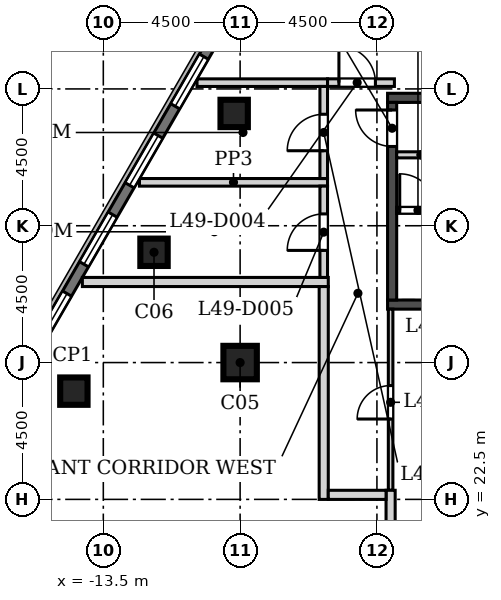
"""IFC4 building model, lengths in metres.
Left out: names, types, materials, properties, quantities, classifications, styles, units other than length and angle.
Written with IfcOpenShell. Run it as: python <this file> out.ifc"""

import sys

from ifc_helpers import new_model, si_unit, direction, frame, frame_2d, origin, origin_2d, place, context, subcontext, project, spatial, rectangle, extrude, element, fill, save


model = new_model("IFC4")
c1 = context("Model", 3, precision=1e-05, world=origin(), true_north=direction((0.0, 1.0)))
c2 = subcontext(c1, "Body", "Model", "MODEL_VIEW")
j1 = project(units=[si_unit("LENGTHUNIT", "METRE"), si_unit("PLANEANGLEUNIT", "RADIAN")], contexts=[c1])
p1 = place(None, origin())
s1 = spatial("IfcSite", under=j1, at=p1, CompositionType="ELEMENT")
p2 = place(p1, origin())
s2 = spatial("IfcBuilding", under=s1, at=p2, CompositionType="ELEMENT")
p3 = place(p2, frame((0.0, 0.0, 218.1)))
s3 = spatial("IfcBuildingStorey", under=s2, at=p3, CompositionType="ELEMENT", Elevation=218.1)
for number, where, z_axis, x_axis in (
    (1, (-9.196, 35.194, 0.0), (0.0, 0.0, 1.0), (1.0, 0.0, 0.0)),
    (2, (-11.832, 30.627, 0.0), (0.0, 0.0, 1.0), (1.0, 0.0, 0.0)),
    (3, (-14.469, 26.06, 0.0), (0.0, 0.0, 1.0), (1.0, 0.0, 0.0)),
):
    element("IfcColumn", number, at=place(p3, frame(where, z_axis=z_axis, x_axis=x_axis)), inside=s3, PredefinedType="COLUMN", context=c2, shape_type="SweptSolid", body=[
        extrude(rectangle(XDim=0.9, YDim=0.9, at=origin_2d()), origin(), (0.0, 0.0, 1.0), 5.4),
    ])
p4 = place(p3, frame((-9.0, 27.0, 0.0), z_axis=(0.0, 0.0, 1.0), x_axis=(1.0, 0.0, 0.0)))
e4 = element("IfcColumn", 4, at=p4, inside=s3, PredefinedType="COLUMN", context=c2, shape_type="SweptSolid", body=[
    extrude(rectangle(XDim=1.1, YDim=1.1, at=origin_2d()), origin(), (0.0, 0.0, 1.0), 5.4),
])
p5 = place(p3, frame((-4.353, 47.177, 0.0), z_axis=(0.0, 0.0, 1.0), x_axis=(-0.500000533701, -0.866025095652, 0.0)))
e5 = element("IfcWall", 5, at=p5, inside=s3, PredefinedType="SOLIDWALL", context=c2, shape_type="SweptSolid", body=[
    extrude(rectangle(XDim=45.573, YDim=0.34, at=frame_2d((22.787, 0.0))), origin(), (0.0, 0.0, 1.0), 5.0),
])
p6 = place(p5, frame((2.68, 0.0, 0.9)))
e6 = element("IfcOpeningElement", 6, at=p6, cuts=e5, PredefinedType="OPENING", context=c2, shape_type="SweptSolid", body=[
    extrude(rectangle(XDim=1.885, YDim=3.0, at=frame_2d((0.942, 1.5))), frame((0.0, 0.18, 0.0), z_axis=(0.0, -1.0, 0.0), x_axis=(1.0, 0.0, 0.0)), (0.0, 0.0, 1.0), 0.36),
])
p7 = place(p5, frame((5.68, 0.0, 0.9)))
e7 = element("IfcOpeningElement", 7, at=p7, cuts=e5, PredefinedType="OPENING", context=c2, shape_type="SweptSolid", body=[
    extrude(rectangle(XDim=1.885, YDim=3.0, at=frame_2d((0.942, 1.5))), frame((0.0, 0.18, 0.0), z_axis=(0.0, -1.0, 0.0), x_axis=(1.0, 0.0, 0.0)), (0.0, 0.0, 1.0), 0.36),
])
p8 = place(p5, frame((8.68, 0.0, 0.9)))
e8 = element("IfcOpeningElement", 8, at=p8, cuts=e5, PredefinedType="OPENING", context=c2, shape_type="SweptSolid", body=[
    extrude(rectangle(XDim=1.885, YDim=3.0, at=frame_2d((0.942, 1.5))), frame((0.0, 0.18, 0.0), z_axis=(0.0, -1.0, 0.0), x_axis=(1.0, 0.0, 0.0)), (0.0, 0.0, 1.0), 0.36),
])
p9 = place(p5, frame((11.68, 0.0, 0.9)))
e9 = element("IfcOpeningElement", 9, at=p9, cuts=e5, PredefinedType="OPENING", context=c2, shape_type="SweptSolid", body=[
    extrude(rectangle(XDim=1.885, YDim=3.0, at=frame_2d((0.942, 1.5))), frame((0.0, 0.18, 0.0), z_axis=(0.0, -1.0, 0.0), x_axis=(1.0, 0.0, 0.0)), (0.0, 0.0, 1.0), 0.36),
])
p10 = place(p5, frame((14.68, 0.0, 0.9)))
e10 = element("IfcOpeningElement", 10, at=p10, cuts=e5, PredefinedType="OPENING", context=c2, shape_type="SweptSolid", body=[
    extrude(rectangle(XDim=1.885, YDim=3.0, at=frame_2d((0.942, 1.5))), frame((0.0, 0.18, 0.0), z_axis=(0.0, -1.0, 0.0), x_axis=(1.0, 0.0, 0.0)), (0.0, 0.0, 1.0), 0.36),
])
p11 = place(p5, frame((17.68, 0.0, 0.9)))
e11 = element("IfcOpeningElement", 11, at=p11, cuts=e5, PredefinedType="OPENING", context=c2, shape_type="SweptSolid", body=[
    extrude(rectangle(XDim=1.885, YDim=3.0, at=frame_2d((0.942, 1.5))), frame((0.0, 0.18, 0.0), z_axis=(0.0, -1.0, 0.0), x_axis=(1.0, 0.0, 0.0)), (0.0, 0.0, 1.0), 0.36),
])
p12 = place(p5, frame((20.68, 0.0, 0.9)))
e12 = element("IfcOpeningElement", 12, at=p12, cuts=e5, PredefinedType="OPENING", context=c2, shape_type="SweptSolid", body=[
    extrude(rectangle(XDim=1.885, YDim=3.0, at=frame_2d((0.942, 1.5))), frame((0.0, 0.18, 0.0), z_axis=(0.0, -1.0, 0.0), x_axis=(1.0, 0.0, 0.0)), (0.0, 0.0, 1.0), 0.36),
])
p13 = place(p5, frame((23.68, 0.0, 0.9)))
e13 = element("IfcOpeningElement", 13, at=p13, cuts=e5, PredefinedType="OPENING", context=c2, shape_type="SweptSolid", body=[
    extrude(rectangle(XDim=1.885, YDim=3.0, at=frame_2d((0.942, 1.5))), frame((0.0, 0.18, 0.0), z_axis=(0.0, -1.0, 0.0), x_axis=(1.0, 0.0, 0.0)), (0.0, 0.0, 1.0), 0.36),
])
p14 = place(p5, frame((26.68, 0.0, 0.9)))
e14 = element("IfcOpeningElement", 14, at=p14, cuts=e5, PredefinedType="OPENING", context=c2, shape_type="SweptSolid", body=[
    extrude(rectangle(XDim=1.885, YDim=3.0, at=frame_2d((0.942, 1.5))), frame((0.0, 0.18, 0.0), z_axis=(0.0, -1.0, 0.0), x_axis=(1.0, 0.0, 0.0)), (0.0, 0.0, 1.0), 0.36),
])
p15 = place(p5, frame((29.68, 0.0, 0.9)))
e15 = element("IfcOpeningElement", 15, at=p15, cuts=e5, PredefinedType="OPENING", context=c2, shape_type="SweptSolid", body=[
    extrude(rectangle(XDim=1.885, YDim=3.0, at=frame_2d((0.942, 1.5))), frame((0.0, 0.18, 0.0), z_axis=(0.0, -1.0, 0.0), x_axis=(1.0, 0.0, 0.0)), (0.0, 0.0, 1.0), 0.36),
])
p16 = place(p5, frame((32.68, 0.0, 0.9)))
e16 = element("IfcOpeningElement", 16, at=p16, cuts=e5, PredefinedType="OPENING", context=c2, shape_type="SweptSolid", body=[
    extrude(rectangle(XDim=1.885, YDim=3.0, at=frame_2d((0.942, 1.5))), frame((0.0, 0.18, 0.0), z_axis=(0.0, -1.0, 0.0), x_axis=(1.0, 0.0, 0.0)), (0.0, 0.0, 1.0), 0.36),
])
p17 = place(p5, frame((35.68, 0.0, 0.9)))
e17 = element("IfcOpeningElement", 17, at=p17, cuts=e5, PredefinedType="OPENING", context=c2, shape_type="SweptSolid", body=[
    extrude(rectangle(XDim=1.885, YDim=3.0, at=frame_2d((0.942, 1.5))), frame((0.0, 0.18, 0.0), z_axis=(0.0, -1.0, 0.0), x_axis=(1.0, 0.0, 0.0)), (0.0, 0.0, 1.0), 0.36),
])
p18 = place(p5, frame((38.68, 0.0, 0.9)))
e18 = element("IfcOpeningElement", 18, at=p18, cuts=e5, PredefinedType="OPENING", context=c2, shape_type="SweptSolid", body=[
    extrude(rectangle(XDim=1.885, YDim=3.0, at=frame_2d((0.942, 1.5))), frame((0.0, 0.18, 0.0), z_axis=(0.0, -1.0, 0.0), x_axis=(1.0, 0.0, 0.0)), (0.0, 0.0, 1.0), 0.36),
])
p19 = place(p5, frame((41.68, 0.0, 0.9)))
e19 = element("IfcOpeningElement", 19, at=p19, cuts=e5, PredefinedType="OPENING", context=c2, shape_type="SweptSolid", body=[
    extrude(rectangle(XDim=1.885, YDim=3.0, at=frame_2d((0.942, 1.5))), frame((0.0, 0.18, 0.0), z_axis=(0.0, -1.0, 0.0), x_axis=(1.0, 0.0, 0.0)), (0.0, 0.0, 1.0), 0.36),
])
p20 = place(p3, frame((-4.15, 28.907, -0.4), z_axis=(0.0, 0.0, 1.0), x_axis=(1.0, 0.0, 0.0)))
e20 = element("IfcWall", 20, at=p20, inside=s3, PredefinedType="SOLIDWALL", context=c2, shape_type="SweptSolid", body=[
    extrude(rectangle(XDim=8.3, YDim=0.3, at=frame_2d((4.15, 0.0))), origin(), (0.0, 0.0, 1.0), 5.4),
])
p21 = place(p20, frame((1.55, 0.0, 0.4)))
e21 = element("IfcOpeningElement", 21, at=p21, cuts=e20, PredefinedType="OPENING", context=c2, shape_type="SweptSolid", body=[
    extrude(rectangle(XDim=1.2, YDim=2.1, at=frame_2d((0.6, 1.05))), frame((0.0, 0.16, 0.0), z_axis=(0.0, -1.0, 0.0), x_axis=(1.0, 0.0, 0.0)), (0.0, 0.0, 1.0), 0.32),
])
p22 = place(p3, frame((-4.15, 35.707, -0.4), z_axis=(0.0, 0.0, 1.0), x_axis=(1.0, 0.0, 0.0)))
e22 = element("IfcWall", 22, at=p22, inside=s3, PredefinedType="SOLIDWALL", context=c2, shape_type="SweptSolid", body=[
    extrude(rectangle(XDim=8.3, YDim=0.3, at=frame_2d((4.15, 0.0))), origin(), (0.0, 0.0, 1.0), 5.4),
])
p23 = place(p3, frame((-4.0, 29.057, -0.4), z_axis=(0.0, 0.0, 1.0), x_axis=(0.0, 1.0, 0.0)))
e23 = element("IfcWall", 23, at=p23, inside=s3, PredefinedType="SOLIDWALL", context=c2, shape_type="SweptSolid", body=[
    extrude(rectangle(XDim=6.5, YDim=0.3, at=frame_2d((3.25, 0.0))), origin(), (0.0, 0.0, 1.0), 5.4),
])
p24 = place(p23, frame((5.05, 0.0, 0.4)))
e24 = element("IfcOpeningElement", 24, at=p24, cuts=e23, PredefinedType="OPENING", context=c2, shape_type="SweptSolid", body=[
    extrude(rectangle(XDim=1.2, YDim=2.1, at=frame_2d((0.6, 1.05))), frame((0.0, 0.16, 0.0), z_axis=(0.0, -1.0, 0.0), x_axis=(1.0, 0.0, 0.0)), (0.0, 0.0, 1.0), 0.32),
])
p25 = place(p3, frame((-3.85, 32.007, -0.4), z_axis=(0.0, 0.0, 1.0), x_axis=(1.0, 0.0, 0.0)))
e25 = element("IfcWall", 25, at=p25, inside=s3, PredefinedType="SOLIDWALL", context=c2, shape_type="SweptSolid", body=[
    extrude(rectangle(XDim=7.7, YDim=0.2, at=frame_2d((3.85, 0.0))), origin(), (0.0, 0.0, 1.0), 5.4),
])
p26 = place(p25, frame((0.1, 0.0, 0.4)))
e26 = element("IfcOpeningElement", 26, at=p26, cuts=e25, PredefinedType="OPENING", context=c2, shape_type="SweptSolid", body=[
    extrude(rectangle(XDim=1.2, YDim=2.1, at=frame_2d((0.6, 1.05))), frame((0.0, 0.11, 0.0), z_axis=(0.0, -1.0, 0.0), x_axis=(1.0, 0.0, 0.0)), (0.0, 0.0, 1.0), 0.22),
])
p27 = place(p3, frame((-3.85, 33.832, 0.0), z_axis=(0.0, 0.0, 1.0), x_axis=(1.0, 0.0, 0.0)))
e27 = element("IfcWall", 27, at=p27, inside=s3, PredefinedType="SOLIDWALL", context=c2, shape_type="SweptSolid", body=[
    extrude(rectangle(XDim=1.6, YDim=0.2, at=frame_2d((0.8, 0.0))), origin(), (0.0, 0.0, 1.0), 5.0),
])
p28 = place(p3, frame((-14.189, 29.65, 0.0), z_axis=(0.0, 0.0, 1.0), x_axis=(1.0, 0.0, 0.0)))
e28 = element("IfcWall", 28, at=p28, inside=s3, PredefinedType="SOLIDWALL", context=c2, shape_type="SweptSolid", body=[
    extrude(rectangle(XDim=8.089, YDim=0.3, at=frame_2d((4.044, 0.0))), origin(), (0.0, 0.0, 1.0), 5.0),
])
p29 = place(p3, frame((-6.25, 22.499, 0.0), z_axis=(0.0, 0.0, 1.0), x_axis=(0.0, 1.0, 0.0)))
e29 = element("IfcWall", 29, at=p29, inside=s3, PredefinedType="SOLIDWALL", context=c2, shape_type="SweptSolid", body=[
    extrude(rectangle(XDim=7.001, YDim=0.3, at=frame_2d((3.5, 0.0))), origin(), (0.0, 0.0, 1.0), 5.0),
])
p30 = place(p3, frame((-12.311, 32.928, 0.0), z_axis=(0.0, 0.0, 1.0), x_axis=(1.0, 0.0, 0.0)))
e30 = element("IfcWall", 30, at=p30, inside=s3, PredefinedType="SOLIDWALL", context=c2, shape_type="SweptSolid", body=[
    extrude(rectangle(XDim=6.186, YDim=0.25, at=frame_2d((3.093, 0.0))), origin(), (0.0, 0.0, 1.0), 5.0),
])
p31 = place(p3, frame((-4.05, 22.799, 0.0), z_axis=(0.0, 0.0, 1.0), x_axis=(0.0, 1.0, 0.0)))
e31 = element("IfcWall", 31, at=p31, inside=s3, PredefinedType="PARTITIONING", context=c2, shape_type="SweptSolid", body=[
    extrude(rectangle(XDim=5.958, YDim=0.15, at=frame_2d((2.979, 0.0))), origin(), (0.0, 0.0, 1.0), 5.0),
])
p32 = place(p31, frame((2.344, 0.0, 0.0)))
e32 = element("IfcOpeningElement", 32, at=p32, cuts=e31, PredefinedType="OPENING", context=c2, shape_type="SweptSolid", body=[
    extrude(rectangle(XDim=1.1, YDim=2.1, at=frame_2d((0.55, 1.05))), frame((0.0, 0.085, 0.0), z_axis=(0.0, -1.0, 0.0), x_axis=(1.0, 0.0, 0.0)), (0.0, 0.0, 1.0), 0.17),
])
p33 = place(p3, frame((-6.125, 36.206, 0.0), z_axis=(0.0, 0.0, 1.0), x_axis=(-1.0, 0.0, 0.0)))
e33 = element("IfcWall", 33, at=p33, inside=s3, PredefinedType="SOLIDWALL", context=c2, shape_type="SweptSolid", body=[
    extrude(rectangle(XDim=4.293, YDim=0.25, at=frame_2d((2.146, 0.0))), origin(), (0.0, 0.0, 1.0), 5.0),
])
p34 = place(p3, frame((-6.25, 33.053, 0.0), z_axis=(0.0, 0.0, 1.0), x_axis=(0.0, 1.0, 0.0)))
e34 = element("IfcWall", 34, at=p34, inside=s3, PredefinedType="SOLIDWALL", context=c2, shape_type="SweptSolid", body=[
    extrude(rectangle(XDim=3.028, YDim=0.25, at=frame_2d((1.514, 0.0))), origin(), (0.0, 0.0, 1.0), 5.0),
])
p35 = place(p34, frame((0.914, 0.0, 0.0)))
e35 = element("IfcOpeningElement", 35, at=p35, cuts=e34, PredefinedType="OPENING", context=c2, shape_type="SweptSolid", body=[
    extrude(rectangle(XDim=1.2, YDim=2.1, at=frame_2d((0.6, 1.05))), frame((0.0, 0.135, 0.0), z_axis=(0.0, -1.0, 0.0), x_axis=(1.0, 0.0, 0.0)), (0.0, 0.0, 1.0), 0.27),
])
p36 = place(p3, frame((-6.25, 29.8, 0.0), z_axis=(0.0, 0.0, 1.0), x_axis=(0.0, 1.0, 0.0)))
e36 = element("IfcWall", 36, at=p36, inside=s3, PredefinedType="SOLIDWALL", context=c2, shape_type="SweptSolid", body=[
    extrude(rectangle(XDim=3.003, YDim=0.25, at=frame_2d((1.501, 0.0))), origin(), (0.0, 0.0, 1.0), 5.0),
])
p37 = place(p36, frame((0.889, 0.0, 0.0)))
e37 = element("IfcOpeningElement", 37, at=p37, cuts=e36, PredefinedType="OPENING", context=c2, shape_type="SweptSolid", body=[
    extrude(rectangle(XDim=1.2, YDim=2.1, at=frame_2d((0.6, 1.05))), frame((0.0, 0.135, 0.0), z_axis=(0.0, -1.0, 0.0), x_axis=(1.0, 0.0, 0.0)), (0.0, 0.0, 1.0), 0.27),
])
p38 = place(p3, frame((-4.05, 20.5, 0.0), z_axis=(0.0, 0.0, 1.0), x_axis=(0.0, 1.0, 0.0)))
e38 = element("IfcWall", 38, at=p38, inside=s3, PredefinedType="SOLIDWALL", context=c2, shape_type="SweptSolid", body=[
    extrude(rectangle(XDim=2.299, YDim=0.3, at=frame_2d((1.149, 0.0))), origin(), (0.0, 0.0, 1.0), 5.0),
])
p39 = place(p3, frame((-6.125, 36.207, 0.0), z_axis=(0.0, 0.0, 1.0), x_axis=(1.0, 0.0, 0.0)))
e39 = element("IfcWall", 39, at=p39, inside=s3, PredefinedType="SOLIDWALL", context=c2, shape_type="SweptSolid", body=[
    extrude(rectangle(XDim=2.2, YDim=0.25, at=frame_2d((1.1, 0.0))), origin(), (0.0, 0.0, 1.0), 5.0),
])
p40 = place(p39, frame((0.375, 0.0, 0.0)))
e40 = element("IfcOpeningElement", 40, at=p40, cuts=e39, PredefinedType="OPENING", context=c2, shape_type="SweptSolid", body=[
    extrude(rectangle(XDim=1.2, YDim=2.1, at=frame_2d((0.6, 1.05))), frame((0.0, 0.135, 0.0), z_axis=(0.0, -1.0, 0.0), x_axis=(1.0, 0.0, 0.0)), (0.0, 0.0, 1.0), 0.27),
])
p41 = place(p3, frame((-4.2, 22.649, 0.0), z_axis=(0.0, 0.0, 1.0), x_axis=(-1.0, 0.0, 0.0)))
e41 = element("IfcWall", 41, at=p41, inside=s3, PredefinedType="SOLIDWALL", context=c2, shape_type="SweptSolid", body=[
    extrude(rectangle(XDim=1.9, YDim=0.3, at=frame_2d((0.95, 0.0))), origin(), (0.0, 0.0, 1.0), 5.0),
])
p42 = place(p9, origin())
e42 = element("IfcWindow", 42, at=p42, inside=s3, PartitioningType="SINGLE_PANEL", PredefinedType="WINDOW", context=c2, shape_type="SweptSolid", body=[
    extrude(rectangle(XDim=1.885, YDim=3.0, at=frame_2d((0.942, 1.5))), frame((0.0, 0.11, 0.0), z_axis=(0.0, -1.0, 0.0), x_axis=(1.0, 0.0, 0.0)), (0.0, 0.0, 1.0), 0.06),
])
fill(e9, e42)
p43 = place(p10, origin())
e43 = element("IfcWindow", 43, at=p43, inside=s3, PartitioningType="SINGLE_PANEL", PredefinedType="WINDOW", context=c2, shape_type="SweptSolid", body=[
    extrude(rectangle(XDim=1.885, YDim=3.0, at=frame_2d((0.942, 1.5))), frame((0.0, 0.11, 0.0), z_axis=(0.0, -1.0, 0.0), x_axis=(1.0, 0.0, 0.0)), (0.0, 0.0, 1.0), 0.06),
])
fill(e10, e43)
p44 = place(p11, origin())
e44 = element("IfcWindow", 44, at=p44, inside=s3, PartitioningType="SINGLE_PANEL", PredefinedType="WINDOW", context=c2, shape_type="SweptSolid", body=[
    extrude(rectangle(XDim=1.885, YDim=3.0, at=frame_2d((0.942, 1.5))), frame((0.0, 0.11, 0.0), z_axis=(0.0, -1.0, 0.0), x_axis=(1.0, 0.0, 0.0)), (0.0, 0.0, 1.0), 0.06),
])
fill(e11, e44)
p45 = place(p12, origin())
e45 = element("IfcWindow", 45, at=p45, inside=s3, PartitioningType="SINGLE_PANEL", PredefinedType="WINDOW", context=c2, shape_type="SweptSolid", body=[
    extrude(rectangle(XDim=1.885, YDim=3.0, at=frame_2d((0.942, 1.5))), frame((0.0, 0.11, 0.0), z_axis=(0.0, -1.0, 0.0), x_axis=(1.0, 0.0, 0.0)), (0.0, 0.0, 1.0), 0.06),
])
fill(e12, e45)
p46 = place(p26, origin())
e46 = element("IfcDoor", 46, at=p46, inside=s3, OperationType="SINGLE_SWING_LEFT", PredefinedType="DOOR", context=c2, shape_type="SweptSolid", body=[
    extrude(rectangle(XDim=1.2, YDim=2.1, at=frame_2d((0.6, 1.05))), frame((0.0, 0.025, 0.0), z_axis=(0.0, -1.0, 0.0), x_axis=(1.0, 0.0, 0.0)), (0.0, 0.0, 1.0), 0.05),
])
fill(e26, e46)
p47 = place(p24, origin())
e47 = element("IfcDoor", 47, at=p47, inside=s3, OperationType="SINGLE_SWING_RIGHT", PredefinedType="DOOR", context=c2, shape_type="SweptSolid", body=[
    extrude(rectangle(XDim=1.2, YDim=2.1, at=frame_2d((0.6, 1.05))), frame((0.0, 0.025, 0.0), z_axis=(0.0, -1.0, 0.0), x_axis=(1.0, 0.0, 0.0)), (0.0, 0.0, 1.0), 0.05),
])
fill(e24, e47)
p48 = place(p32, origin())
e48 = element("IfcDoor", 48, at=p48, inside=s3, OperationType="SINGLE_SWING_LEFT", PredefinedType="DOOR", context=c2, shape_type="SweptSolid", body=[
    extrude(rectangle(XDim=1.1, YDim=2.1, at=frame_2d((0.55, 1.05))), frame((0.0, 0.025, 0.0), z_axis=(0.0, -1.0, 0.0), x_axis=(1.0, 0.0, 0.0)), (0.0, 0.0, 1.0), 0.05),
])
fill(e32, e48)
p49 = place(p40, origin())
e49 = element("IfcDoor", 49, at=p49, inside=s3, OperationType="SINGLE_SWING_LEFT", PredefinedType="DOOR", context=c2, shape_type="SweptSolid", body=[
    extrude(rectangle(XDim=1.2, YDim=2.1, at=frame_2d((0.6, 1.05))), frame((0.0, 0.025, 0.0), z_axis=(0.0, -1.0, 0.0), x_axis=(1.0, 0.0, 0.0)), (0.0, 0.0, 1.0), 0.05),
])
fill(e40, e49)
p50 = place(p37, origin())
e50 = element("IfcDoor", 50, at=p50, inside=s3, OperationType="SINGLE_SWING_LEFT", PredefinedType="DOOR", context=c2, shape_type="SweptSolid", body=[
    extrude(rectangle(XDim=1.2, YDim=2.1, at=frame_2d((0.6, 1.05))), frame((0.0, 0.025, 0.0), z_axis=(0.0, -1.0, 0.0), x_axis=(1.0, 0.0, 0.0)), (0.0, 0.0, 1.0), 0.05),
])
fill(e37, e50)
p51 = place(p35, origin())
e51 = element("IfcDoor", 51, at=p51, inside=s3, OperationType="SINGLE_SWING_LEFT", PredefinedType="DOOR", context=c2, shape_type="SweptSolid", body=[
    extrude(rectangle(XDim=1.2, YDim=2.1, at=frame_2d((0.6, 1.05))), frame((0.0, 0.025, 0.0), z_axis=(0.0, -1.0, 0.0), x_axis=(1.0, 0.0, 0.0)), (0.0, 0.0, 1.0), 0.05),
])
fill(e35, e51)
save(model, sys.argv[1])
